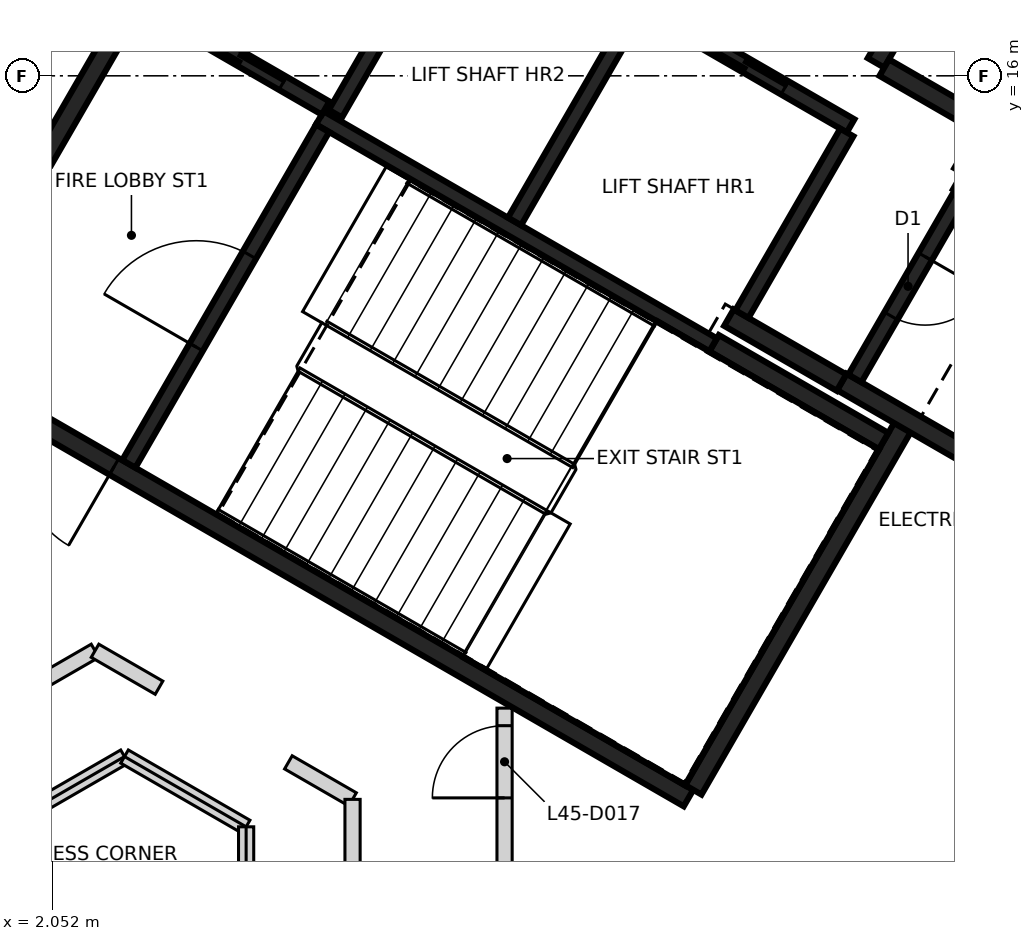
"""IFC4 building model, lengths in metres.
Left out: names, types, materials, properties, quantities, classifications, styles, units other than length and angle.
Written with IfcOpenShell. Run it as: python <this file> out.ifc"""

import sys

from ifc_helpers import new_model, si_unit, direction, frame, frame_2d, origin, place, context, subcontext, project, spatial, rectangle, extrude, element, fill, save


model = new_model("IFC4")
c1 = context("Model", 3, precision=1e-05, world=origin(), true_north=direction((0.0, 1.0)))
c2 = subcontext(c1, "Body", "Model", "MODEL_VIEW")
j1 = project(units=[si_unit("LENGTHUNIT", "METRE"), si_unit("PLANEANGLEUNIT", "RADIAN")], contexts=[c1])
p1 = place(None, origin())
s1 = spatial("IfcSite", under=j1, at=p1, CompositionType="ELEMENT")
p2 = place(p1, origin())
s2 = spatial("IfcBuilding", under=s1, at=p2, CompositionType="ELEMENT")
p3 = place(p2, frame((0.0, 0.0, 182.8)))
s3 = spatial("IfcBuildingStorey", under=s2, at=p3, CompositionType="ELEMENT", Elevation=182.8)
p4 = place(p3, frame((10.42, 6.498, 0.0), z_axis=(0.0, 0.0, 1.0), x_axis=(-0.866021906294, 0.500006057782, 0.0)))
e1 = element("IfcWall", 1, at=p4, inside=s3, PredefinedType="SHEAR", context=c2, shape_type="SweptSolid", body=[
    extrude(rectangle(XDim=11.55, YDim=0.25, at=frame_2d((5.775, 0.0))), origin(), (0.0, 0.0, 1.0), 3.25),
])
p5 = place(p4, frame((10.025, 0.0, 0.0)))
e2 = element("IfcOpeningElement", 2, at=p5, cuts=e1, PredefinedType="OPENING", context=c2, shape_type="SweptSolid", body=[
    extrude(rectangle(XDim=1.2, YDim=2.1, at=frame_2d((0.6, 1.05))), frame((0.0, 0.135, 0.0), z_axis=(0.0, -1.0, 0.0), x_axis=(1.0, 0.0, 0.0)), (0.0, 0.0, 1.0), 0.27),
])
p6 = place(p4, frame((8.725, 0.0, 0.0)))
e3 = element("IfcOpeningElement", 3, at=p6, cuts=e1, PredefinedType="OPENING", context=c2, shape_type="SweptSolid", body=[
    extrude(rectangle(XDim=1.2, YDim=2.1, at=frame_2d((0.6, 1.05))), frame((0.0, 0.135, 0.0), z_axis=(0.0, -1.0, 0.0), x_axis=(1.0, 0.0, 0.0)), (0.0, 0.0, 1.0), 0.27),
])
p7 = place(p3, frame((0.48, 12.381, 0.0), z_axis=(0.0, 0.0, 1.0), x_axis=(0.49999885962, 0.866026062182, 0.0)))
e4 = element("IfcWall", 4, at=p7, inside=s3, PredefinedType="SHEAR", context=c2, shape_type="SweptSolid", body=[
    extrude(rectangle(XDim=5.225, YDim=0.25, at=frame_2d((2.612, 0.0))), origin(), (0.0, 0.0, 1.0), 3.25),
])
p8 = place(p3, frame((13.238, 11.378, 0.0), z_axis=(0.0, 0.0, 1.0), x_axis=(-0.500008851346, -0.866020293397, 0.0)))
e5 = element("IfcWall", 5, at=p8, inside=s3, PredefinedType="SHEAR", context=c2, shape_type="SweptSolid", body=[
    extrude(rectangle(XDim=5.51, YDim=0.25, at=frame_2d((2.755, 0.0))), origin(), (0.0, 0.0, 1.0), 3.25),
])
p9 = place(p3, frame((14.918, 10.54, 0.0), z_axis=(0.0, 0.0, 1.0), x_axis=(-0.866063538972, 0.499933942099, 0.0)))
e6 = element("IfcWall", 6, at=p9, inside=s3, PredefinedType="SHEAR", context=c2, shape_type="SweptSolid", body=[
    extrude(rectangle(XDim=2.865, YDim=0.25, at=frame_2d((1.432, 0.0))), origin(), (0.0, 0.0, 1.0), 3.25),
])
p10 = place(p3, frame((13.963, 14.614, 0.0), z_axis=(0.0, 0.0, 1.0), x_axis=(0.866042235819, -0.499970844928, 0.0)))
e7 = element("IfcWall", 7, at=p10, inside=s3, PredefinedType="SHEAR", context=c2, shape_type="SweptSolid", body=[
    extrude(rectangle(XDim=2.865, YDim=0.25, at=frame_2d((1.432, 0.0))), origin(), (0.0, 0.0, 1.0), 3.25),
])
p11 = place(p3, frame((10.757, 12.481, 0.0), z_axis=(0.0, 0.0, 1.0), x_axis=(0.866022940537, -0.500004266446, 0.0)))
e8 = element("IfcWall", 8, at=p11, inside=s3, PredefinedType="SHEAR", context=c2, shape_type="SweptSolid", body=[
    extrude(rectangle(XDim=2.575, YDim=0.25, at=frame_2d((1.287, 0.0))), origin(), (0.0, 0.0, 1.0), 3.25),
])
p12 = place(p3, frame((13.819, 17.785, 0.0), z_axis=(0.0, 0.0, 1.0), x_axis=(-0.500039802285, -0.866002422705, 0.0)))
e9 = element("IfcWall", 9, at=p12, inside=s3, PredefinedType="SHEAR", context=c2, shape_type="SweptSolid", body=[
    extrude(rectangle(XDim=1.865, YDim=0.25, at=frame_2d((0.932, 0.0))), origin(), (0.0, 0.0, 1.0), 3.25),
])
p13 = place(p3, frame((12.433, 11.964, 0.0), z_axis=(0.0, 0.0, 1.0), x_axis=(-0.866038183914, 0.499977863513, 0.0)))
e10 = element("IfcWall", 10, at=p13, inside=s3, PredefinedType="SHEAR", context=c2, shape_type="SweptSolid", body=[
    extrude(rectangle(XDim=1.71, YDim=0.25, at=frame_2d((0.855, 0.0))), origin(), (0.0, 0.0, 1.0), 3.25),
])
p14 = place(p3, frame((12.995, 16.108, 0.0), z_axis=(0.0, 0.0, 1.0), x_axis=(0.866044474677, -0.49996696679, 0.0)))
e11 = element("IfcWall", 11, at=p14, inside=s3, PredefinedType="SHEAR", context=c2, shape_type="SweptSolid", body=[
    extrude(rectangle(XDim=1.584, YDim=0.25, at=frame_2d((0.792, 0.0))), origin(), (0.0, 0.0, 1.0), 3.25),
])
p15 = place(p3, frame((14.305, 15.207, 0.0), z_axis=(0.0, 0.0, 1.0), x_axis=(-0.499848422343, -0.866112899501, 0.0)))
e12 = element("IfcWall", 12, at=p15, inside=s3, PredefinedType="SHEAR", context=c2, shape_type="SweptSolid", body=[
    extrude(rectangle(XDim=0.559, YDim=0.25, at=frame_2d((0.28, 0.0))), origin(), (0.0, 0.0, 1.0), 3.25),
])
p16 = place(p3, frame((12.552, 15.342, 0.0), z_axis=(0.0, 0.0, 1.0), x_axis=(-0.866030299012, 0.499991521122, 0.0)))
e13 = element("IfcWall", 13, at=p16, inside=s3, PredefinedType="SHEAR", context=c2, shape_type="SweptSolid", body=[
    extrude(rectangle(XDim=6.1, YDim=0.2, at=frame_2d((3.05, 0.0))), origin(), (0.0, 0.0, 1.0), 3.25),
])
p17 = place(p16, frame((1.0, 0.0, 0.0)))
e14 = element("IfcOpeningElement", 14, at=p17, cuts=e13, PredefinedType="OPENING", context=c2, shape_type="SweptSolid", body=[
    extrude(rectangle(XDim=1.2, YDim=2.1, at=frame_2d((0.6, 1.05))), frame((0.0, 0.11, 0.0), z_axis=(0.0, -1.0, 0.0), x_axis=(1.0, 0.0, 0.0)), (0.0, 0.0, 1.0), 0.22),
])
p18 = place(p16, frame((3.982, 0.0, 0.0)))
e15 = element("IfcOpeningElement", 15, at=p18, cuts=e13, PredefinedType="OPENING", context=c2, shape_type="SweptSolid", body=[
    extrude(rectangle(XDim=1.2, YDim=2.1, at=frame_2d((0.6, 1.05))), frame((0.0, 0.11, 0.0), z_axis=(0.0, -1.0, 0.0), x_axis=(1.0, 0.0, 0.0)), (0.0, 0.0, 1.0), 0.22),
])
p19 = place(p3, frame((10.743, 12.46, 0.0), z_axis=(0.0, 0.0, 1.0), x_axis=(-0.866018848283, 0.500011354289, 0.0)))
e16 = element("IfcWall", 16, at=p19, inside=s3, PredefinedType="SHEAR", context=c2, shape_type="SweptSolid", body=[
    extrude(rectangle(XDim=5.974, YDim=0.2, at=frame_2d((2.987, 0.0))), origin(), (0.0, 0.0, 1.0), 3.25),
])
p20 = place(p3, frame((3.057, 10.895, 0.0), z_axis=(0.0, 0.0, 1.0), x_axis=(0.500027839223, 0.866009330205, 0.0)))
e17 = element("IfcWall", 17, at=p20, inside=s3, PredefinedType="SHEAR", context=c2, shape_type="SweptSolid", body=[
    extrude(rectangle(XDim=5.098, YDim=0.2, at=frame_2d((2.549, 0.0))), origin(), (0.0, 0.0, 1.0), 3.25),
])
p21 = place(p20, frame((1.774, 0.0, 0.0)))
e18 = element("IfcOpeningElement", 18, at=p21, cuts=e17, PredefinedType="OPENING", context=c2, shape_type="SweptSolid", body=[
    extrude(rectangle(XDim=1.4, YDim=2.1, at=frame_2d((0.7, 1.05))), frame((0.0, 0.11, 0.0), z_axis=(0.0, -1.0, 0.0), x_axis=(1.0, 0.0, 0.0)), (0.0, 0.0, 1.0), 0.22),
])
p22 = place(p3, frame((8.132, 14.084, 0.0), z_axis=(0.0, 0.0, 1.0), x_axis=(0.500030834389, 0.86600760081, 0.0)))
e19 = element("IfcWall", 19, at=p22, inside=s3, PredefinedType="SHEAR", context=c2, shape_type="SweptSolid", body=[
    extrude(rectangle(XDim=3.198, YDim=0.2, at=frame_2d((1.599, 0.0))), origin(), (0.0, 0.0, 1.0), 3.25),
])
p23 = place(p3, frame((14.008, 14.442, 0.0), z_axis=(0.0, 0.0, 1.0), x_axis=(-0.499986818241, -0.866033014143, 0.0)))
e20 = element("IfcWall", 20, at=p23, inside=s3, PredefinedType="SHEAR", context=c2, shape_type="SweptSolid", body=[
    extrude(rectangle(XDim=2.798, YDim=0.2, at=frame_2d((1.399, 0.0))), origin(), (0.0, 0.0, 1.0), 3.25),
])
p24 = place(p23, frame((0.949, 0.0, 0.0)))
e21 = element("IfcOpeningElement", 21, at=p24, cuts=e20, PredefinedType="OPENING", context=c2, shape_type="SweptSolid", body=[
    extrude(rectangle(XDim=0.9, YDim=2.1, at=frame_2d((0.45, 1.05))), frame((0.0, 0.11, 0.0), z_axis=(0.0, -1.0, 0.0), x_axis=(1.0, 0.0, 0.0)), (0.0, 0.0, 1.0), 0.22),
])
p25 = place(p3, frame((12.502, 15.255, 0.0), z_axis=(0.0, 0.0, 1.0), x_axis=(-0.499965018551, -0.866045599391, 0.0)))
e22 = element("IfcWall", 22, at=p25, inside=s3, PredefinedType="SHEAR", context=c2, shape_type="SweptSolid", body=[
    extrude(rectangle(XDim=2.759, YDim=0.2, at=frame_2d((1.379, 0.0))), origin(), (0.0, 0.0, 1.0), 3.25),
])
p26 = place(p3, frame((7.324, 18.187, 0.0), z_axis=(0.0, 0.0, 1.0), x_axis=(-0.499967891604, -0.866043940782, 0.0)))
e23 = element("IfcWall", 23, at=p26, inside=s3, PredefinedType="SHEAR", context=c2, shape_type="SweptSolid", body=[
    extrude(rectangle(XDim=3.1, YDim=0.2, at=frame_2d((1.55, 0.0))), origin(), (0.0, 0.0, 1.0), 3.25),
])
p27 = place(p3, frame((5.646, 15.576, 0.0), z_axis=(0.0, 0.0, 1.0), x_axis=(-0.866018407898, 0.500012117035, 0.0)))
e24 = element("IfcWall", 24, at=p27, inside=s3, PredefinedType="SHEAR", context=c2, shape_type="SweptSolid", body=[
    extrude(rectangle(XDim=2.651, YDim=0.2, at=frame_2d((1.325, 0.0))), origin(), (0.0, 0.0, 1.0), 3.25),
])
p28 = place(p27, frame((0.652, 0.0, 0.0)))
e25 = element("IfcOpeningElement", 25, at=p28, cuts=e24, PredefinedType="OPENING", context=c2, shape_type="SweptSolid", body=[
    extrude(rectangle(XDim=1.3, YDim=2.1, at=frame_2d((0.65, 1.05))), frame((0.0, 0.11, 0.0), z_axis=(0.0, -1.0, 0.0), x_axis=(1.0, 0.0, 0.0)), (0.0, 0.0, 1.0), 0.22),
])
p29 = place(p3, frame((-8.612, 1.956, 0.0), z_axis=(0.0, 0.0, 1.0), x_axis=(0.866034386606, 0.499984440973, 0.0)))
e26 = element("IfcWall", 26, at=p29, inside=s3, PredefinedType="PARTITIONING", context=c2, shape_type="SweptSolid", body=[
    extrude(rectangle(XDim=12.96, YDim=0.2, at=frame_2d((6.48, 0.0))), origin(), (0.0, 0.0, 1.0), 3.25),
])
p30 = place(p29, frame((8.105, 0.0, 0.0)))
e27 = element("IfcOpeningElement", 27, at=p30, cuts=e26, PredefinedType="OPENING", context=c2, shape_type="SweptSolid", body=[
    extrude(rectangle(XDim=0.9, YDim=2.1, at=frame_2d((0.45, 1.05))), frame((0.0, 0.11, 0.0), z_axis=(0.0, -1.0, 0.0), x_axis=(1.0, 0.0, 0.0)), (0.0, 0.0, 1.0), 0.22),
])
p31 = place(p29, frame((1.637, 0.0, 0.0)))
e28 = element("IfcOpeningElement", 28, at=p31, cuts=e26, PredefinedType="OPENING", context=c2, shape_type="SweptSolid", body=[
    extrude(rectangle(XDim=0.9, YDim=2.1, at=frame_2d((0.45, 1.05))), frame((0.0, 0.11, 0.0), z_axis=(0.0, -1.0, 0.0), x_axis=(1.0, 0.0, 0.0)), (0.0, 0.0, 1.0), 0.22),
])
p32 = place(p3, frame((-1.084, 12.65, 0.0), z_axis=(0.0, 0.0, 1.0), x_axis=(0.492271892014, 0.870441488173, 0.0)))
e29 = element("IfcWall", 29, at=p32, inside=s3, PredefinedType="PARTITIONING", context=c2, shape_type="SweptSolid", body=[
    extrude(rectangle(XDim=10.531, YDim=0.2, at=frame_2d((5.266, 0.0))), origin(), (0.0, 0.0, 1.0), 3.25),
])
p33 = place(p32, frame((4.161, 0.0, 0.0)))
e30 = element("IfcOpeningElement", 30, at=p33, cuts=e29, PredefinedType="OPENING", context=c2, shape_type="SweptSolid", body=[
    extrude(rectangle(XDim=0.95, YDim=2.1, at=frame_2d((0.475, 1.05))), frame((0.0, 0.11, 0.0), z_axis=(0.0, -1.0, 0.0), x_axis=(1.0, 0.0, 0.0)), (0.0, 0.0, 1.0), 0.22),
])
p34 = place(p3, frame((2.612, 8.436, 0.0), z_axis=(0.0, 0.0, 1.0), x_axis=(0.866055964107, -0.499947064232, 0.0)))
e31 = element("IfcWall", 31, at=p34, inside=s3, PredefinedType="PARTITIONING", context=c2, shape_type="SweptSolid", body=[
    extrude(rectangle(XDim=0.972, YDim=0.2, at=frame_2d((0.486, 0.0))), origin(), (0.0, 0.0, 1.0), 3.25),
])
p35 = place(p3, frame((5.156, 6.968, 0.0), z_axis=(0.0, 0.0, 1.0), x_axis=(0.866123013327, -0.49983089719, 0.0)))
e32 = element("IfcWall", 32, at=p35, inside=s3, PredefinedType="PARTITIONING", context=c2, shape_type="SweptSolid", body=[
    extrude(rectangle(XDim=0.974, YDim=0.2, at=frame_2d((0.487, 0.0))), origin(), (0.0, 0.0, 1.0), 3.25),
])
p36 = place(p3, frame((6.0, -6.481, 0.0), z_axis=(0.0, 0.0, 1.0), x_axis=(0.0, 1.0, 0.0)))
e33 = element("IfcWall", 33, at=p36, inside=s3, PredefinedType="PARTITIONING", context=c2, shape_type="SweptSolid", body=[
    extrude(rectangle(XDim=12.962, YDim=0.2, at=frame_2d((6.481, 0.0))), origin(), (0.0, 0.0, 1.0), 3.25),
])
p37 = place(p36, frame((3.956, 0.0, 0.0)))
e34 = element("IfcOpeningElement", 34, at=p37, cuts=e33, PredefinedType="OPENING", context=c2, shape_type="SweptSolid", body=[
    extrude(rectangle(XDim=0.9, YDim=2.1, at=frame_2d((0.45, 1.05))), frame((0.0, 0.11, 0.0), z_axis=(0.0, -1.0, 0.0), x_axis=(1.0, 0.0, 0.0)), (0.0, 0.0, 1.0), 0.22),
])
p38 = place(p36, frame((10.425, 0.0, 0.0)))
e35 = element("IfcOpeningElement", 35, at=p38, cuts=e33, PredefinedType="OPENING", context=c2, shape_type="SweptSolid", body=[
    extrude(rectangle(XDim=0.9, YDim=2.1, at=frame_2d((0.45, 1.05))), frame((0.0, 0.11, 0.0), z_axis=(0.0, -1.0, 0.0), x_axis=(1.0, 0.0, 0.0)), (0.0, 0.0, 1.0), 0.22),
])
p39 = place(p3, frame((8.0, -4.966, 0.0), z_axis=(0.0, 0.0, 1.0), x_axis=(0.0, 1.0, 0.0)))
e36 = element("IfcWall", 36, at=p39, inside=s3, PredefinedType="PARTITIONING", context=c2, shape_type="SweptSolid", body=[
    extrude(rectangle(XDim=12.647, YDim=0.2, at=frame_2d((6.324, 0.0))), origin(), (0.0, 0.0, 1.0), 3.25),
])
p40 = place(p39, frame((4.438, 0.0, 0.0)))
e37 = element("IfcOpeningElement", 37, at=p40, cuts=e36, PredefinedType="OPENING", context=c2, shape_type="SweptSolid", body=[
    extrude(rectangle(XDim=0.95, YDim=2.1, at=frame_2d((0.475, 1.05))), frame((0.0, 0.11, 0.0), z_axis=(0.0, -1.0, 0.0), x_axis=(1.0, 0.0, 0.0)), (0.0, 0.0, 1.0), 0.22),
])
p41 = place(p39, frame((11.466, 0.0, 0.0)))
e38 = element("IfcOpeningElement", 38, at=p41, cuts=e36, PredefinedType="OPENING", context=c2, shape_type="SweptSolid", body=[
    extrude(rectangle(XDim=0.95, YDim=2.1, at=frame_2d((0.475, 1.05))), frame((0.0, 0.11, 0.0), z_axis=(0.0, -1.0, 0.0), x_axis=(1.0, 0.0, 0.0)), (0.0, 0.0, 1.0), 0.22),
])
p42 = place(p3, frame((-7.6, 0.924, 0.0), z_axis=(0.0, 0.0, 1.0), x_axis=(0.866028806638, 0.499994106039, 0.0)))
e39 = element("IfcWall", 39, at=p42, inside=s3, PredefinedType="PARTITIONING", context=c2, shape_type="SweptSolid", body=[
    extrude(rectangle(XDim=12.24, YDim=0.2, at=frame_2d((6.12, 0.0))), origin(), (0.0, 0.0, 1.0), 3.25),
])
p43 = place(p3, frame((3.0, 7.044, 0.0), z_axis=(0.0, 0.0, 1.0), x_axis=(0.865875248522, -0.500259986404, 0.0)))
e40 = element("IfcWall", 40, at=p43, inside=s3, PredefinedType="PARTITIONING", context=c2, shape_type="SweptSolid", body=[
    extrude(rectangle(XDim=1.848, YDim=0.2, at=frame_2d((0.924, 0.0))), origin(), (0.0, 0.0, 1.0), 3.25),
])
p44 = place(p3, frame((4.6, -6.12, 0.0), z_axis=(0.0, 0.0, 1.0), x_axis=(0.0, 1.0, 0.0)))
e41 = element("IfcWall", 41, at=p44, inside=s3, PredefinedType="PARTITIONING", context=c2, shape_type="SweptSolid", body=[
    extrude(rectangle(XDim=12.24, YDim=0.2, at=frame_2d((6.12, 0.0))), origin(), (0.0, 0.0, 1.0), 3.25),
])
p45 = place(p28, origin())
e42 = element("IfcDoor", 42, at=p45, inside=s3, OperationType="SLIDING_TO_RIGHT", PredefinedType="DOOR", context=c2, shape_type="SweptSolid", body=[
    extrude(rectangle(XDim=1.3, YDim=2.1, at=frame_2d((0.65, 1.05))), frame((0.0, 0.025, 0.0), z_axis=(0.0, -1.0, 0.0), x_axis=(1.0, 0.0, 0.0)), (0.0, 0.0, 1.0), 0.05),
])
fill(e25, e42)
p46 = place(p17, origin())
e43 = element("IfcDoor", 43, at=p46, inside=s3, OperationType="DOUBLE_DOOR_SLIDING", PredefinedType="DOOR", context=c2, shape_type="SweptSolid", body=[
    extrude(rectangle(XDim=1.2, YDim=2.1, at=frame_2d((0.6, 1.05))), frame((0.0, 0.025, 0.0), z_axis=(0.0, -1.0, 0.0), x_axis=(1.0, 0.0, 0.0)), (0.0, 0.0, 1.0), 0.05),
])
fill(e14, e43)
p47 = place(p6, origin())
e44 = element("IfcDoor", 44, at=p47, inside=s3, OperationType="SINGLE_SWING_RIGHT", PredefinedType="DOOR", context=c2, shape_type="SweptSolid", body=[
    extrude(rectangle(XDim=1.2, YDim=2.1, at=frame_2d((0.6, 1.05))), frame((0.0, 0.025, 0.0), z_axis=(0.0, -1.0, 0.0), x_axis=(1.0, 0.0, 0.0)), (0.0, 0.0, 1.0), 0.05),
])
fill(e3, e44)
p48 = place(p21, origin())
e45 = element("IfcDoor", 45, at=p48, inside=s3, OperationType="SINGLE_SWING_RIGHT", PredefinedType="DOOR", context=c2, shape_type="SweptSolid", body=[
    extrude(rectangle(XDim=1.4, YDim=2.1, at=frame_2d((0.7, 1.05))), frame((0.0, 0.025, 0.0), z_axis=(0.0, -1.0, 0.0), x_axis=(1.0, 0.0, 0.0)), (0.0, 0.0, 1.0), 0.05),
])
fill(e18, e45)
p49 = place(p24, origin())
e46 = element("IfcDoor", 46, at=p49, inside=s3, OperationType="SINGLE_SWING_LEFT", PredefinedType="DOOR", context=c2, shape_type="SweptSolid", body=[
    extrude(rectangle(XDim=0.9, YDim=2.1, at=frame_2d((0.45, 1.05))), frame((0.0, 0.025, 0.0), z_axis=(0.0, -1.0, 0.0), x_axis=(1.0, 0.0, 0.0)), (0.0, 0.0, 1.0), 0.05),
])
fill(e21, e46)
p50 = place(p41, frame((0.95, 0.0, 0.0), z_axis=(0.0, 0.0, 1.0), x_axis=(-1.0, 0.0, 0.0)))
e47 = element("IfcDoor", 47, at=p50, inside=s3, OperationType="SINGLE_SWING_LEFT", PredefinedType="DOOR", context=c2, shape_type="SweptSolid", body=[
    extrude(rectangle(XDim=0.95, YDim=2.1, at=frame_2d((0.475, 1.05))), frame((0.0, 0.025, 0.0), z_axis=(0.0, -1.0, 0.0), x_axis=(1.0, 0.0, 0.0)), (0.0, 0.0, 1.0), 0.05),
])
fill(e38, e47)
save(model, sys.argv[1])
